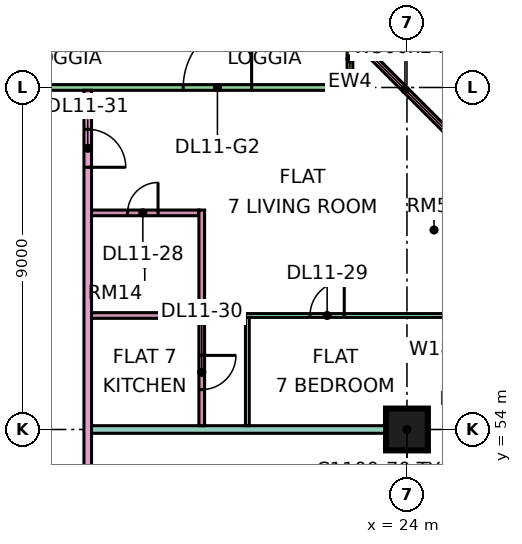
"""IFC4 building model, lengths in metres.
Left out: names, types, materials, properties, quantities, classifications, styles, units other than length and angle.
Written with IfcOpenShell. Run it as: python <this file> out.ifc"""

import sys

from ifc_helpers import new_model, si_unit, direction, frame, frame_2d, origin, origin_2d, place, context, subcontext, project, spatial, rectangle, extrude, element, fill, save


model = new_model("IFC4")
c1 = context("Model", 3, precision=1e-05, world=origin(), true_north=direction((0.0, 1.0)))
c2 = subcontext(c1, "Body", "Model", "MODEL_VIEW")
j1 = project(units=[si_unit("LENGTHUNIT", "METRE"), si_unit("PLANEANGLEUNIT", "RADIAN")], contexts=[c1])
p1 = place(None, origin())
s1 = spatial("IfcSite", under=j1, at=p1, CompositionType="ELEMENT")
p2 = place(p1, origin())
s2 = spatial("IfcBuilding", under=s1, at=p2, CompositionType="ELEMENT")
p3 = place(p2, frame((0.0, 0.0, 56.4)))
s3 = spatial("IfcBuildingStorey", under=s2, at=p3, CompositionType="ELEMENT", Elevation=56.4)
p4 = place(p3, frame((24.0, 54.0, 0.0), z_axis=(0.0, 0.0, 1.0), x_axis=(1.0, 0.0, 0.0)))
e1 = element("IfcColumn", 1, at=p4, inside=s3, PredefinedType="COLUMN", context=c2, shape_type="SweptSolid", body=[
    extrude(rectangle(XDim=1.1, YDim=1.1, at=origin_2d()), origin(), (0.0, 0.0, 1.0), 3.75),
])
p5 = place(p3, frame((25.447, 61.447, 0.0), z_axis=(0.0, 0.0, 1.0), x_axis=(-0.707106781187, 0.707106781187, 0.0)))
e2 = element("IfcWall", 2, at=p5, inside=s3, PredefinedType="SOLIDWALL", context=c2, shape_type="SweptSolid", body=[
    extrude(rectangle(XDim=4.243, YDim=0.15, at=frame_2d((2.121, 0.0))), origin(), (0.0, 0.0, 1.0), 3.35),
])
p6 = place(p5, frame((0.621, 0.0, 0.45)))
e3 = element("IfcOpeningElement", 3, at=p6, cuts=e2, PredefinedType="OPENING", context=c2, shape_type="SweptSolid", body=[
    extrude(rectangle(XDim=3.0, YDim=2.4, at=frame_2d((1.5, 1.2))), frame((0.0, 0.085, 0.0), z_axis=(0.0, -1.0, 0.0), x_axis=(1.0, 0.0, 0.0)), (0.0, 0.0, 1.0), 0.17),
])
p7 = place(p3, frame((22.425, 63.0, 0.0), z_axis=(0.0, 0.0, 1.0), x_axis=(-1.0, 0.0, 0.0)))
e4 = element("IfcWall", 4, at=p7, inside=s3, PredefinedType="SOLIDWALL", context=c2, shape_type="SweptSolid", body=[
    extrude(rectangle(XDim=10.35, YDim=0.15, at=frame_2d((5.175, 0.0))), origin(), (0.0, 0.0, 1.0), 3.35),
])
p8 = place(p7, frame((2.512, 0.0, 0.0)))
e5 = element("IfcOpeningElement", 5, at=p8, cuts=e4, PredefinedType="OPENING", context=c2, shape_type="SweptSolid", body=[
    extrude(rectangle(XDim=1.8, YDim=2.4, at=frame_2d((0.9, 1.2))), frame((0.0, 0.085, 0.0), z_axis=(0.0, -1.0, 0.0), x_axis=(1.0, 0.0, 0.0)), (0.0, 0.0, 1.0), 0.17),
])
p9 = place(p3, frame((22.5, 64.5, 0.0), z_axis=(0.0, 0.0, 1.0), x_axis=(0.0, -1.0, 0.0)))
e6 = element("IfcWall", 6, at=p9, inside=s3, PredefinedType="SOLIDWALL", context=c2, shape_type="SweptSolid", body=[
    extrude(rectangle(XDim=1.5, YDim=0.15, at=frame_2d((0.75, 0.0))), origin(), (0.0, 0.0, 1.0), 3.35),
])
p10 = place(p3, frame((15.6, 51.225, 0.0), z_axis=(0.0, 0.0, 1.0), x_axis=(0.0, 1.0, 0.0)))
e7 = element("IfcWall", 7, at=p10, inside=s3, PredefinedType="PARTITIONING", context=c2, shape_type="SweptSolid", body=[
    extrude(rectangle(XDim=11.701, YDim=0.2, at=frame_2d((5.851, 0.0))), origin(), (0.0, 0.0, 1.0), 3.35),
])
p11 = place(p10, frame((9.675, 0.0, 0.0)))
e8 = element("IfcOpeningElement", 8, at=p11, cuts=e7, PredefinedType="OPENING", context=c2, shape_type="SweptSolid", body=[
    extrude(rectangle(XDim=1.0, YDim=2.1, at=frame_2d((0.5, 1.05))), frame((0.0, 0.11, 0.0), z_axis=(0.0, -1.0, 0.0), x_axis=(1.0, 0.0, 0.0)), (0.0, 0.0, 1.0), 0.22),
])
p12 = place(p3, frame((15.7, 54.0, 0.0), z_axis=(0.0, 0.0, 1.0), x_axis=(1.0, 0.0, 0.0)))
e9 = element("IfcWall", 9, at=p12, inside=s3, PredefinedType="PARTITIONING", context=c2, shape_type="SweptSolid", body=[
    extrude(rectangle(XDim=8.3, YDim=0.2, at=frame_2d((4.15, 0.0))), origin(), (0.0, 0.0, 1.0), 3.35),
])
p13 = place(p3, frame((15.7, 57.0, 0.0), z_axis=(0.0, 0.0, 1.0), x_axis=(1.0, 0.0, 0.0)))
e10 = element("IfcWall", 10, at=p13, inside=s3, PredefinedType="PARTITIONING", context=c2, shape_type="SweptSolid", body=[
    extrude(rectangle(XDim=2.825, YDim=0.15, at=frame_2d((1.413, 0.0))), origin(), (0.0, 0.0, 1.0), 3.35),
])
p14 = place(p3, frame((15.7, 59.7, 0.0), z_axis=(0.0, 0.0, 1.0), x_axis=(1.0, 0.0, 0.0)))
e11 = element("IfcWall", 11, at=p14, inside=s3, PredefinedType="PARTITIONING", context=c2, shape_type="SweptSolid", body=[
    extrude(rectangle(XDim=2.825, YDim=0.15, at=frame_2d((1.413, 0.0))), origin(), (0.0, 0.0, 1.0), 3.35),
])
p15 = place(p14, frame((0.95, 0.0, 0.0)))
e12 = element("IfcOpeningElement", 12, at=p15, cuts=e11, PredefinedType="OPENING", context=c2, shape_type="SweptSolid", body=[
    extrude(rectangle(XDim=0.8, YDim=2.1, at=frame_2d((0.4, 1.05))), frame((0.0, 0.085, 0.0), z_axis=(0.0, -1.0, 0.0), x_axis=(1.0, 0.0, 0.0)), (0.0, 0.0, 1.0), 0.17),
])
p16 = place(p3, frame((18.6, 54.1, 0.0), z_axis=(0.0, 0.0, 1.0), x_axis=(0.0, 1.0, 0.0)))
e13 = element("IfcWall", 13, at=p16, inside=s3, PredefinedType="PARTITIONING", context=c2, shape_type="SweptSolid", body=[
    extrude(rectangle(XDim=5.675, YDim=0.15, at=frame_2d((2.837, 0.0))), origin(), (0.0, 0.0, 1.0), 3.35),
])
p17 = place(p16, frame((0.95, 0.0, 0.0)))
e14 = element("IfcOpeningElement", 14, at=p17, cuts=e13, PredefinedType="OPENING", context=c2, shape_type="SweptSolid", body=[
    extrude(rectangle(XDim=0.9, YDim=2.1, at=frame_2d((0.45, 1.05))), frame((0.0, 0.085, 0.0), z_axis=(0.0, -1.0, 0.0), x_axis=(1.0, 0.0, 0.0)), (0.0, 0.0, 1.0), 0.17),
])
p18 = place(p3, frame((19.75, 57.0, 0.0), z_axis=(0.0, 0.0, 1.0), x_axis=(1.0, 0.0, 0.0)))
e15 = element("IfcWall", 15, at=p18, inside=s3, PredefinedType="PARTITIONING", context=c2, shape_type="SweptSolid", body=[
    extrude(rectangle(XDim=5.6, YDim=0.1, at=frame_2d((2.8, 0.0))), origin(), (0.0, 0.0, 1.0), 3.35),
])
p19 = place(p18, frame((1.7, 0.0, 0.0)))
e16 = element("IfcOpeningElement", 16, at=p19, cuts=e15, PredefinedType="OPENING", context=c2, shape_type="SweptSolid", body=[
    extrude(rectangle(XDim=0.9, YDim=2.1, at=frame_2d((0.45, 1.05))), frame((0.0, 0.06, 0.0), z_axis=(0.0, -1.0, 0.0), x_axis=(1.0, 0.0, 0.0)), (0.0, 0.0, 1.0), 0.12),
])
p20 = place(p3, frame((19.8, 54.1, 0.0), z_axis=(0.0, 0.0, 1.0), x_axis=(0.0, 1.0, 0.0)))
e17 = element("IfcWall", 17, at=p20, inside=s3, PredefinedType="PARTITIONING", context=c2, shape_type="SweptSolid", body=[
    extrude(rectangle(XDim=2.85, YDim=0.1, at=frame_2d((1.425, 0.0))), origin(), (0.0, 0.0, 1.0), 3.35),
])
p21 = place(p6, origin())
e18 = element("IfcWindow", 18, at=p21, inside=s3, PartitioningType="SINGLE_PANEL", PredefinedType="WINDOW", context=c2, shape_type="SweptSolid", body=[
    extrude(rectangle(XDim=3.0, YDim=2.4, at=frame_2d((1.5, 1.2))), frame((0.0, 0.03, 0.0), z_axis=(0.0, -1.0, 0.0), x_axis=(1.0, 0.0, 0.0)), (0.0, 0.0, 1.0), 0.06),
])
fill(e3, e18)
p22 = place(p8, frame((1.8, 0.0, 0.0), z_axis=(0.0, 0.0, 1.0), x_axis=(-1.0, 0.0, 0.0)))
e19 = element("IfcDoor", 19, at=p22, inside=s3, OperationType="DOUBLE_DOOR_SINGLE_SWING", PredefinedType="DOOR", context=c2, shape_type="SweptSolid", body=[
    extrude(rectangle(XDim=1.8, YDim=2.4, at=frame_2d((0.9, 1.2))), frame((0.0, 0.025, 0.0), z_axis=(0.0, -1.0, 0.0), x_axis=(1.0, 0.0, 0.0)), (0.0, 0.0, 1.0), 0.05),
])
fill(e5, e19)
p23 = place(p15, frame((0.8, 0.0, 0.0), z_axis=(0.0, 0.0, 1.0), x_axis=(-1.0, 0.0, 0.0)))
e20 = element("IfcDoor", 20, at=p23, inside=s3, OperationType="SINGLE_SWING_RIGHT", PredefinedType="DOOR", context=c2, shape_type="SweptSolid", body=[
    extrude(rectangle(XDim=0.8, YDim=2.1, at=frame_2d((0.4, 1.05))), frame((0.0, 0.025, 0.0), z_axis=(0.0, -1.0, 0.0), x_axis=(1.0, 0.0, 0.0)), (0.0, 0.0, 1.0), 0.05),
])
fill(e12, e20)
p24 = place(p19, frame((0.9, 0.0, 0.0), z_axis=(0.0, 0.0, 1.0), x_axis=(-1.0, 0.0, 0.0)))
e21 = element("IfcDoor", 21, at=p24, inside=s3, OperationType="SINGLE_SWING_RIGHT", PredefinedType="DOOR", context=c2, shape_type="SweptSolid", body=[
    extrude(rectangle(XDim=0.9, YDim=2.1, at=frame_2d((0.45, 1.05))), frame((0.0, 0.025, 0.0), z_axis=(0.0, -1.0, 0.0), x_axis=(1.0, 0.0, 0.0)), (0.0, 0.0, 1.0), 0.05),
])
fill(e16, e21)
p25 = place(p17, origin())
e22 = element("IfcDoor", 22, at=p25, inside=s3, OperationType="SINGLE_SWING_RIGHT", PredefinedType="DOOR", context=c2, shape_type="SweptSolid", body=[
    extrude(rectangle(XDim=0.9, YDim=2.1, at=frame_2d((0.45, 1.05))), frame((0.0, 0.025, 0.0), z_axis=(0.0, -1.0, 0.0), x_axis=(1.0, 0.0, 0.0)), (0.0, 0.0, 1.0), 0.05),
])
fill(e14, e22)
p26 = place(p11, frame((1.0, 0.0, 0.0), z_axis=(0.0, 0.0, 1.0), x_axis=(-1.0, 0.0, 0.0)))
e23 = element("IfcDoor", 23, at=p26, inside=s3, OperationType="SINGLE_SWING_LEFT", PredefinedType="DOOR", context=c2, shape_type="SweptSolid", body=[
    extrude(rectangle(XDim=1.0, YDim=2.1, at=frame_2d((0.5, 1.05))), frame((0.0, 0.025, 0.0), z_axis=(0.0, -1.0, 0.0), x_axis=(1.0, 0.0, 0.0)), (0.0, 0.0, 1.0), 0.05),
])
fill(e8, e23)
save(model, sys.argv[1])
